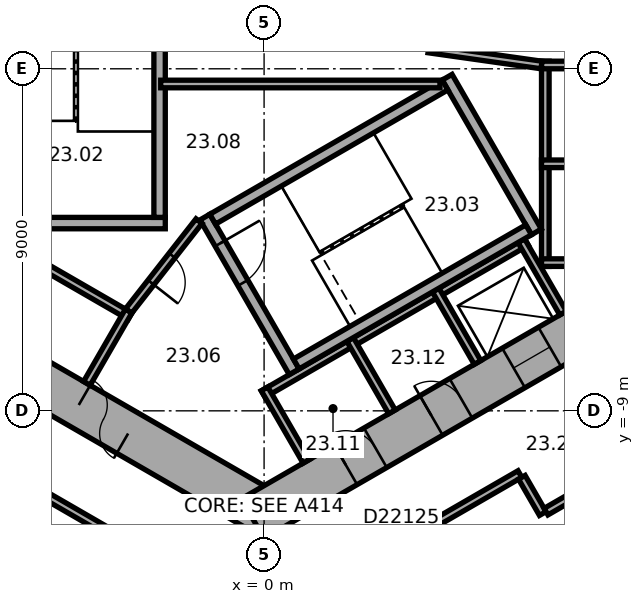
"""IFC4 building model, lengths in metres.
Left out: names, types, materials, properties, quantities, classifications, styles, units other than length and angle.
Written with IfcOpenShell. Run it as: python <this file> out.ifc"""

import sys

from ifc_helpers import new_model, si_unit, direction, frame, frame_2d, origin, place, context, subcontext, project, spatial, rectangle, extrude, element, fill, save


model = new_model("IFC4")
c1 = context("Model", 3, precision=1e-05, world=origin(), true_north=direction((0.0, 1.0)))
c2 = subcontext(c1, "Body", "Model", "MODEL_VIEW")
j1 = project(units=[si_unit("LENGTHUNIT", "METRE"), si_unit("PLANEANGLEUNIT", "RADIAN")], contexts=[c1])
p1 = place(None, origin())
s1 = spatial("IfcSite", under=j1, at=p1, CompositionType="ELEMENT")
p2 = place(p1, origin())
s2 = spatial("IfcBuilding", under=s1, at=p2, CompositionType="ELEMENT")
p3 = place(p2, frame((0.0, 0.0, 100.1)))
s3 = spatial("IfcBuildingStorey", under=s2, at=p3, CompositionType="ELEMENT", Elevation=100.1)
p4 = place(p3, frame((-10.4, -5.658, 0.0), z_axis=(0.0, 0.0, 1.0), x_axis=(0.866021384402, -0.500006961711, 0.0)))
e1 = element("IfcWall", 1, at=p4, inside=s3, PredefinedType="SHEAR", context=c2, shape_type="SweptSolid", body=[
    extrude(rectangle(XDim=12.355, YDim=1.2, at=frame_2d((6.178, 0.0))), origin(), (0.0, 0.0, 1.0), 3.3),
])
p5 = place(p4, frame((6.378, 0.0, 0.0)))
e2 = element("IfcOpeningElement", 2, at=p5, cuts=e1, PredefinedType="OPENING", context=c2, shape_type="SweptSolid", body=[
    extrude(rectangle(XDim=1.5, YDim=2.1, at=frame_2d((0.75, 1.05))), frame((0.0, 0.61, 0.0), z_axis=(0.0, -1.0, 0.0), x_axis=(1.0, 0.0, 0.0)), (0.0, 0.0, 1.0), 1.22),
])
p6 = place(p4, frame((3.228, 0.0, 0.0)))
e3 = element("IfcOpeningElement", 3, at=p6, cuts=e1, PredefinedType="OPENING", context=c2, shape_type="SweptSolid", body=[
    extrude(rectangle(XDim=0.9, YDim=2.1, at=frame_2d((0.45, 1.05))), frame((0.0, 0.61, 0.0), z_axis=(0.0, -1.0, 0.0), x_axis=(1.0, 0.0, 0.0)), (0.0, 0.0, 1.0), 1.22),
])
p7 = place(p3, frame((-0.3, -11.836, 0.0), z_axis=(0.0, 0.0, 1.0), x_axis=(0.866021384402, 0.500006961711, 0.0)))
e4 = element("IfcWall", 4, at=p7, inside=s3, PredefinedType="SHEAR", context=c2, shape_type="SweptSolid", body=[
    extrude(rectangle(XDim=12.355, YDim=1.2, at=frame_2d((6.178, 0.0))), origin(), (0.0, 0.0, 1.0), 3.3),
])
p8 = place(p7, frame((2.828, 0.0, 0.0)))
e5 = element("IfcOpeningElement", 5, at=p8, cuts=e4, PredefinedType="OPENING", context=c2, shape_type="SweptSolid", body=[
    extrude(rectangle(XDim=0.9, YDim=2.1, at=frame_2d((0.45, 1.05))), frame((0.0, 0.61, 0.0), z_axis=(0.0, -1.0, 0.0), x_axis=(1.0, 0.0, 0.0)), (0.0, 0.0, 1.0), 1.22),
])
p9 = place(p7, frame((5.428, 0.0, 0.0)))
e6 = element("IfcOpeningElement", 6, at=p9, cuts=e4, PredefinedType="OPENING", context=c2, shape_type="SweptSolid", body=[
    extrude(rectangle(XDim=0.9, YDim=2.1, at=frame_2d((0.45, 1.05))), frame((0.0, 0.61, 0.0), z_axis=(0.0, -1.0, 0.0), x_axis=(1.0, 0.0, 0.0)), (0.0, 0.0, 1.0), 1.22),
])
p10 = place(p7, frame((7.928, 0.0, 0.0)))
e7 = element("IfcOpeningElement", 7, at=p10, cuts=e4, PredefinedType="OPENING", context=c2, shape_type="SweptSolid", body=[
    extrude(rectangle(XDim=1.1, YDim=2.1, at=frame_2d((0.55, 1.05))), frame((0.0, 0.61, 0.0), z_axis=(0.0, -1.0, 0.0), x_axis=(1.0, 0.0, 0.0)), (0.0, 0.0, 1.0), 1.22),
])
p11 = place(p3, frame((7.4, -5.2, 0.0), z_axis=(0.0, 0.0, 1.0), x_axis=(0.0, 1.0, 0.0)))
e8 = element("IfcWall", 8, at=p11, inside=s3, PredefinedType="PARTITIONING", context=c2, shape_type="SweptSolid", body=[
    extrude(rectangle(XDim=5.4, YDim=0.2, at=frame_2d((2.7, 0.0))), origin(), (0.0, 0.0, 1.0), 3.05),
])
for number, where, z_axis, x_axis in (
    (9, (7.3, -5.1, 0.0), (0.0, 0.0, 1.0), (1.0, 0.0, 0.0)),
    (10, (7.3, -2.5, 0.0), (0.0, 0.0, 1.0), (1.0, 0.0, 0.0)),
    (11, (7.3, 0.1, 0.0), (0.0, 0.0, 1.0), (1.0, 0.0, 0.0)),
):
    element("IfcWall", number, at=place(p3, frame(where, z_axis=z_axis, x_axis=x_axis)), inside=s3, PredefinedType="PARTITIONING", context=c2, shape_type="SweptSolid", body=[
        extrude(rectangle(XDim=2.2, YDim=0.2, at=frame_2d((1.1, 0.0))), origin(), (0.0, 0.0, 1.0), 3.05),
    ])
p12 = place(p3, frame((-8.203, -3.809, 0.0), z_axis=(0.0, 0.0, 1.0), x_axis=(0.866028230842, -0.499995103361, 0.0)))
e12 = element("IfcWall", 12, at=p12, inside=s3, PredefinedType="PARTITIONING", context=c2, shape_type="SweptSolid", body=[
    extrude(rectangle(XDim=5.4, YDim=0.2, at=frame_2d((2.7, 0.0))), origin(), (0.0, 0.0, 1.0), 3.05),
])
p13 = place(p3, frame((-3.563, -6.372, 0.0), z_axis=(0.0, 0.0, 1.0), x_axis=(-0.499994660107, -0.866028486751, 0.0)))
e13 = element("IfcWall", 13, at=p13, inside=s3, PredefinedType="PARTITIONING", context=c2, shape_type="SweptSolid", body=[
    extrude(rectangle(XDim=2.2, YDim=0.2, at=frame_2d((1.1, 0.0))), origin(), (0.0, 0.0, 1.0), 3.05),
])
p14 = place(p3, frame((-0.024, -8.559, 0.0), z_axis=(0.0, 0.0, 1.0), x_axis=(0.866026010844, 0.49999894854, 0.0)))
e14 = element("IfcWall", 14, at=p14, inside=s3, PredefinedType="PARTITIONING", context=c2, shape_type="SweptSolid", body=[
    extrude(rectangle(XDim=8.0, YDim=0.2, at=frame_2d((4.0, 0.0))), origin(), (0.0, 0.0, 1.0), 3.05),
])
for number, where, z_axis, x_axis in (
    (15, (0.013, -8.422, 0.0), (0.0, 0.0, 1.0), (0.5, -0.866, 0.0)),
    (16, (2.264, -7.122, 0.0), (0.0, 0.0, 1.0), (0.5, -0.866, 0.0)),
    (17, (4.516, -5.822, 0.0), (0.0, 0.0, 1.0), (0.5, -0.866, 0.0)),
    (18, (6.768, -4.522, 0.0), (0.0, 0.0, 1.0), (0.5, -0.866, 0.0)),
):
    element("IfcWall", number, at=place(p3, frame(where, z_axis=z_axis, x_axis=x_axis)), inside=s3, PredefinedType="PARTITIONING", context=c2, shape_type="SweptSolid", body=[
        extrude(rectangle(XDim=2.2, YDim=0.2, at=frame_2d((1.1, 0.0))), origin(), (0.0, 0.0, 1.0), 3.05),
    ])
p15 = place(p3, frame((-2.6, -4.06, 0.0), z_axis=(0.0, 0.0, 1.0), x_axis=(-1.0, 0.0, 0.0)))
e19 = element("IfcWall", 19, at=p15, inside=s3, PredefinedType="SHEAR", context=c2, shape_type="SweptSolid", body=[
    extrude(rectangle(XDim=4.7, YDim=0.3, at=frame_2d((2.35, 0.0))), origin(), (0.0, 0.0, 1.0), 3.05),
])
p16 = place(p3, frame((-2.75, 3.15, 0.0), z_axis=(0.0, 0.0, 1.0), x_axis=(0.0, -1.0, 0.0)))
e20 = element("IfcWall", 20, at=p16, inside=s3, PredefinedType="SHEAR", context=c2, shape_type="SweptSolid", body=[
    extrude(rectangle(XDim=7.06, YDim=0.3, at=frame_2d((3.53, 0.0))), origin(), (0.0, 0.0, 1.0), 3.05),
])
p17 = place(p3, frame((-1.558, -3.902, 0.0), z_axis=(0.0, 0.0, 1.0), x_axis=(0.499977259774, -0.866038532462, 0.0)))
e21 = element("IfcWall", 21, at=p17, inside=s3, PredefinedType="SHEAR", context=c2, shape_type="SweptSolid", body=[
    extrude(rectangle(XDim=4.7, YDim=0.3, at=frame_2d((2.35, 0.0))), origin(), (0.0, 0.0, 1.0), 3.05),
])
p18 = place(p17, frame((0.8, 0.0, 0.0)))
e22 = element("IfcOpeningElement", 22, at=p18, cuts=e21, PredefinedType="OPENING", context=c2, shape_type="SweptSolid", body=[
    extrude(rectangle(XDim=1.2, YDim=2.1, at=frame_2d((0.6, 1.05))), frame((0.0, 0.16, 0.0), z_axis=(0.0, -1.0, 0.0), x_axis=(1.0, 0.0, 0.0)), (0.0, 0.0, 1.0), 0.32),
])
p19 = place(p3, frame((4.816, -0.222, 0.0), z_axis=(0.0, 0.0, 1.0), x_axis=(0.499977259774, -0.866038532462, 0.0)))
e23 = element("IfcWall", 23, at=p19, inside=s3, PredefinedType="SHEAR", context=c2, shape_type="SweptSolid", body=[
    extrude(rectangle(XDim=4.7, YDim=0.3, at=frame_2d((2.35, 0.0))), origin(), (0.0, 0.0, 1.0), 3.05),
])
for number, where, z_axis, x_axis in (
    (24, (-1.353, -3.957, 0.0), (0.0, 0.0, 1.0), (0.866, 0.5, 0.0)),
    (25, (0.847, -7.767, 0.0), (0.0, 0.0, 1.0), (0.866, 0.5, 0.0)),
):
    element("IfcWall", number, at=place(p3, frame(where, z_axis=z_axis, x_axis=x_axis)), inside=s3, PredefinedType="SHEAR", context=c2, shape_type="SweptSolid", body=[
        extrude(rectangle(XDim=7.06, YDim=0.3, at=frame_2d((3.53, 0.0))), origin(), (0.0, 0.0, 1.0), 3.05),
    ])
p20 = place(p3, frame((4.327, 0.521, 0.0), z_axis=(0.0, 0.0, 1.0), x_axis=(0.990124376366, -0.14019172346, 0.0)))
e26 = element("IfcWall", 26, at=p20, inside=s3, PredefinedType="PARTITIONING", context=c2, shape_type="SweptSolid", body=[
    extrude(rectangle(XDim=3.002, YDim=0.2, at=frame_2d((1.501, 0.0))), origin(), (0.0, 0.0, 1.0), 3.05),
])
p21 = place(p3, frame((-1.712, -4.008, 0.0), z_axis=(0.0, 0.0, 1.0), x_axis=(-0.616549420702, -0.787316208287, 0.0)))
e27 = element("IfcWall", 27, at=p21, inside=s3, PredefinedType="PARTITIONING", context=c2, shape_type="SweptSolid", body=[
    extrude(rectangle(XDim=3.002, YDim=0.2, at=frame_2d((1.501, 0.0))), origin(), (0.0, 0.0, 1.0), 3.05),
])
p22 = place(p21, frame((1.15, 0.0, 0.0)))
e28 = element("IfcOpeningElement", 28, at=p22, cuts=e27, PredefinedType="OPENING", context=c2, shape_type="SweptSolid", body=[
    extrude(rectangle(XDim=0.9, YDim=2.1, at=frame_2d((0.45, 1.05))), frame((0.0, 0.11, 0.0), z_axis=(0.0, -1.0, 0.0), x_axis=(1.0, 0.0, 0.0)), (0.0, 0.0, 1.0), 0.22),
])
p23 = place(p3, frame((-2.72, -0.4, 0.0), z_axis=(0.0, 0.0, 1.0), x_axis=(1.0, 0.0, 0.0)))
e29 = element("IfcWall", 29, at=p23, inside=s3, PredefinedType="PARTITIONING", context=c2, shape_type="SweptSolid", body=[
    extrude(rectangle(XDim=7.347, YDim=0.2, at=frame_2d((3.674, 0.0))), origin(), (0.0, 0.0, 1.0), 3.05),
])
p24 = place(p3, frame((-11.615, -7.843, 0.0), z_axis=(0.0, 0.0, 1.0), x_axis=(0.866026466995, -0.499998158461, 0.0)))
e30 = element("IfcWall", 30, at=p24, inside=s3, PredefinedType="PARTITIONING", context=c2, shape_type="SweptSolid", body=[
    extrude(rectangle(XDim=12.315, YDim=0.2, at=frame_2d((6.158, 0.0))), origin(), (0.0, 0.0, 1.0), 3.05),
])
p25 = place(p24, frame((3.333, 0.0, 0.0)))
e31 = element("IfcOpeningElement", 31, at=p25, cuts=e30, PredefinedType="OPENING", context=c2, shape_type="SweptSolid", body=[
    extrude(rectangle(XDim=0.9, YDim=2.1, at=frame_2d((0.45, 1.05))), frame((0.0, 0.11, 0.0), z_axis=(0.0, -1.0, 0.0), x_axis=(1.0, 0.0, 0.0)), (0.0, 0.0, 1.0), 0.22),
])
p26 = place(p24, frame((10.229, 0.0, 0.0)))
e32 = element("IfcOpeningElement", 32, at=p26, cuts=e30, PredefinedType="OPENING", context=c2, shape_type="SweptSolid", body=[
    extrude(rectangle(XDim=0.9, YDim=2.1, at=frame_2d((0.45, 1.05))), frame((0.0, 0.11, 0.0), z_axis=(0.0, -1.0, 0.0), x_axis=(1.0, 0.0, 0.0)), (0.0, 0.0, 1.0), 0.22),
])
p27 = place(p3, frame((1.033, -13.953, 0.0), z_axis=(0.0, 0.0, 1.0), x_axis=(0.866017531406, 0.500013635111, 0.0)))
e33 = element("IfcWall", 33, at=p27, inside=s3, PredefinedType="PARTITIONING", context=c2, shape_type="SweptSolid", body=[
    extrude(rectangle(XDim=6.58, YDim=0.2, at=frame_2d((3.29, 0.0))), origin(), (0.0, 0.0, 1.0), 3.05),
])
p28 = place(p27, frame((2.79, 0.0, 0.0)))
e34 = element("IfcOpeningElement", 34, at=p28, cuts=e33, PredefinedType="OPENING", context=c2, shape_type="SweptSolid", body=[
    extrude(rectangle(XDim=1.0, YDim=2.1, at=frame_2d((0.5, 1.05))), frame((0.0, 0.11, 0.0), z_axis=(0.0, -1.0, 0.0), x_axis=(1.0, 0.0, 0.0)), (0.0, 0.0, 1.0), 0.22),
])
p29 = place(p3, frame((6.782, -10.749, 0.0), z_axis=(0.0, 0.0, 1.0), x_axis=(0.500074377092, -0.865982457891, 0.0)))
e35 = element("IfcWall", 35, at=p29, inside=s3, PredefinedType="PARTITIONING", context=c2, shape_type="SweptSolid", body=[
    extrude(rectangle(XDim=1.101, YDim=0.2, at=frame_2d((0.55, 0.0))), origin(), (0.0, 0.0, 1.0), 3.05),
])
p30 = place(p3, frame((7.419, -11.653, 0.0), z_axis=(0.0, 0.0, 1.0), x_axis=(0.866038154057, 0.49997791523, 0.0)))
e36 = element("IfcWall", 36, at=p30, inside=s3, PredefinedType="PARTITIONING", context=c2, shape_type="SweptSolid", body=[
    extrude(rectangle(XDim=3.502, YDim=0.2, at=frame_2d((1.751, 0.0))), origin(), (0.0, 0.0, 1.0), 3.05),
])
p31 = place(p5, origin())
e37 = element("IfcDoor", 37, at=p31, inside=s3, OperationType="DOUBLE_DOOR_SINGLE_SWING", PredefinedType="DOOR", context=c2, shape_type="SweptSolid", body=[
    extrude(rectangle(XDim=1.5, YDim=2.1, at=frame_2d((0.75, 1.05))), frame((0.0, 0.025, 0.0), z_axis=(0.0, -1.0, 0.0), x_axis=(1.0, 0.0, 0.0)), (0.0, 0.0, 1.0), 0.05),
])
fill(e2, e37)
p32 = place(p18, origin())
e38 = element("IfcDoor", 38, at=p32, inside=s3, OperationType="SINGLE_SWING_RIGHT", PredefinedType="DOOR", context=c2, shape_type="SweptSolid", body=[
    extrude(rectangle(XDim=1.2, YDim=2.1, at=frame_2d((0.6, 1.05))), frame((0.0, 0.025, 0.0), z_axis=(0.0, -1.0, 0.0), x_axis=(1.0, 0.0, 0.0)), (0.0, 0.0, 1.0), 0.05),
])
fill(e22, e38)
p33 = place(p22, origin())
e39 = element("IfcDoor", 39, at=p33, inside=s3, OperationType="SINGLE_SWING_LEFT", PredefinedType="DOOR", context=c2, shape_type="SweptSolid", body=[
    extrude(rectangle(XDim=0.9, YDim=2.1, at=frame_2d((0.45, 1.05))), frame((0.0, 0.025, 0.0), z_axis=(0.0, -1.0, 0.0), x_axis=(1.0, 0.0, 0.0)), (0.0, 0.0, 1.0), 0.05),
])
fill(e28, e39)
p34 = place(p8, origin())
e40 = element("IfcDoor", 40, at=p34, inside=s3, OperationType="SINGLE_SWING_LEFT", PredefinedType="DOOR", context=c2, shape_type="SweptSolid", body=[
    extrude(rectangle(XDim=0.9, YDim=2.1, at=frame_2d((0.45, 1.05))), frame((0.0, 0.025, 0.0), z_axis=(0.0, -1.0, 0.0), x_axis=(1.0, 0.0, 0.0)), (0.0, 0.0, 1.0), 0.05),
])
fill(e5, e40)
p35 = place(p9, origin())
e41 = element("IfcDoor", 41, at=p35, inside=s3, OperationType="SINGLE_SWING_LEFT", PredefinedType="DOOR", context=c2, shape_type="SweptSolid", body=[
    extrude(rectangle(XDim=0.9, YDim=2.1, at=frame_2d((0.45, 1.05))), frame((0.0, 0.025, 0.0), z_axis=(0.0, -1.0, 0.0), x_axis=(1.0, 0.0, 0.0)), (0.0, 0.0, 1.0), 0.05),
])
fill(e6, e41)
p36 = place(p10, origin())
e42 = element("IfcDoor", 42, at=p36, inside=s3, OperationType="DOUBLE_DOOR_SLIDING", PredefinedType="DOOR", context=c2, shape_type="SweptSolid", body=[
    extrude(rectangle(XDim=1.1, YDim=2.1, at=frame_2d((0.55, 1.05))), frame((0.0, 0.025, 0.0), z_axis=(0.0, -1.0, 0.0), x_axis=(1.0, 0.0, 0.0)), (0.0, 0.0, 1.0), 0.05),
])
fill(e7, e42)
save(model, sys.argv[1])
